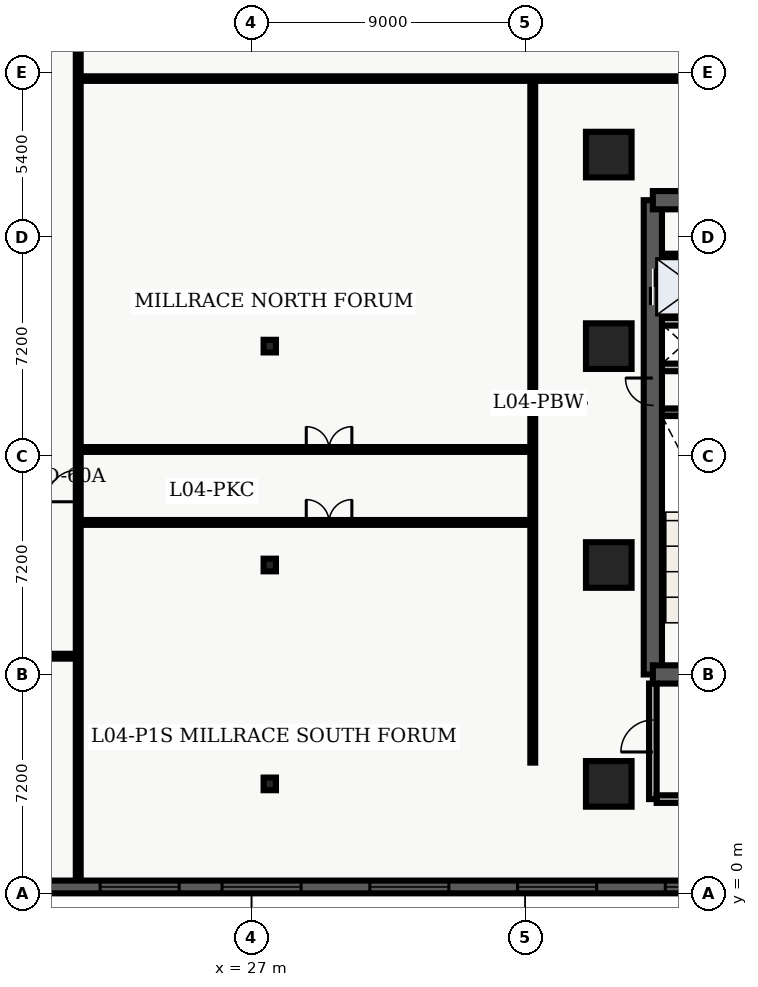
"""IFC4 building model, lengths in metres.
Left out: names, types, materials, properties, quantities, classifications, styles, units other than length and angle.
Written with IfcOpenShell. Run it as: python <this file> out.ifc"""

import sys

from ifc_helpers import new_model, entity, si_unit, converted_unit, direction, frame, origin_with_axes, origin_2d_with_axis, place, context, subcontext, project, spatial, polyline, rectangle, i_section, outline, extrude, element, fill, save


model = new_model("IFC4")
c1 = context("Model", 3, precision=1e-05, world=origin_with_axes(), true_north=direction((0.0, 1.0)))
c2 = subcontext(c1, "Body", "Model", "MODEL_VIEW")
j1 = project(units=[si_unit("LENGTHUNIT", "METRE"), converted_unit("PLANEANGLEUNIT", "DEGREE", entity("IfcPlaneAngleMeasure", 0.017), si_unit("PLANEANGLEUNIT", "RADIAN"), dimensions=[0, 0, 0, 0, 0, 0, 0])], contexts=[c1])
p1 = place(None, origin_with_axes())
s1 = spatial("IfcSite", under=j1, at=p1, CompositionType="ELEMENT")
p2 = place(p1, origin_with_axes())
s2 = spatial("IfcBuilding", under=s1, at=p2, CompositionType="ELEMENT")
p3 = place(p2, frame((0.0, 0.0, 19.8), z_axis=(0.0, 0.0, 1.0), x_axis=(1.0, 0.0, 0.0)))
s3 = spatial("IfcBuildingStorey", under=s2, at=p3, CompositionType="ELEMENT", Elevation=19.8)
p4 = place(p3, frame((40.2, 7.2, 0.0), z_axis=(0.0, 0.0, 1.0), x_axis=(0.0, 1.0, 0.0)))
e1 = element("IfcWall", 1, at=p4, inside=s3, PredefinedType="SHEAR", context=c2, shape_type="SweptSolid", body=[
    extrude(outline(polyline([(0.0, -0.3), (15.6, -0.3), (15.6, 0.3), (0.0, 0.3), (0.0, -0.3)])), origin_with_axes(), (0.0, 0.0, 1.0), 4.26),
])
p5 = place(p4, frame((12.75, 0.0, 0.0), z_axis=(0.0, 0.0, 1.0), x_axis=(1.0, 0.0, 0.0)))
e2 = element("IfcOpeningElement", 2, at=p5, cuts=e1, PredefinedType="OPENING", context=c2, shape_type="SweptSolid", body=[
    extrude(rectangle(XDim=1.2, YDim=0.62, at=origin_2d_with_axis()), origin_with_axes(), (0.0, 0.0, 1.0), 2.15),
])
p6 = place(p4, frame((9.3, 0.0, 0.0), z_axis=(0.0, 0.0, 1.0), x_axis=(1.0, 0.0, 0.0)))
e3 = element("IfcOpeningElement", 3, at=p6, cuts=e1, PredefinedType="OPENING", context=c2, shape_type="SweptSolid", body=[
    extrude(rectangle(XDim=0.9, YDim=0.62, at=origin_2d_with_axis()), origin_with_axes(), (0.0, 0.0, 1.0), 2.15),
])
p7 = place(p3, frame((40.2, 7.2, 0.0), z_axis=(0.0, 0.0, 1.0), x_axis=(1.0, 0.0, 0.0)))
e4 = element("IfcWall", 4, at=p7, inside=s3, PredefinedType="SHEAR", context=c2, shape_type="SweptSolid", body=[
    extrude(outline(polyline([(0.0, -0.3), (7.85, -0.3), (7.85, 0.3), (0.0, 0.3), (0.0, -0.3)])), origin_with_axes(), (0.0, 0.0, 1.0), 4.26),
])
p8 = place(p7, frame((2.175, 0.0, 0.0), z_axis=(0.0, 0.0, 1.0), x_axis=(1.0, 0.0, 0.0)))
e5 = element("IfcOpeningElement", 5, at=p8, cuts=e4, PredefinedType="OPENING", context=c2, shape_type="SweptSolid", body=[
    extrude(rectangle(XDim=1.05, YDim=0.62, at=origin_2d_with_axis()), origin_with_axes(), (0.0, 0.0, 1.0), 2.15),
])
p9 = place(p3, frame((40.2, 22.8, 0.0), z_axis=(0.0, 0.0, 1.0), x_axis=(1.0, 0.0, 0.0)))
e6 = element("IfcWall", 6, at=p9, inside=s3, PredefinedType="SHEAR", context=c2, shape_type="SweptSolid", body=[
    extrude(outline(polyline([(0.0, -0.3), (7.85, -0.3), (7.85, 0.3), (0.0, 0.3), (0.0, -0.3)])), origin_with_axes(), (0.0, 0.0, 1.0), 4.26),
])
p10 = place(p9, frame((5.775, 0.0, 0.0), z_axis=(0.0, 0.0, 1.0), x_axis=(1.0, 0.0, 0.0)))
e7 = element("IfcOpeningElement", 7, at=p10, cuts=e6, PredefinedType="OPENING", context=c2, shape_type="SweptSolid", body=[
    extrude(rectangle(XDim=1.05, YDim=0.62, at=origin_2d_with_axis()), origin_with_axes(), (0.0, 0.0, 1.0), 2.15),
])
p11 = place(p9, frame((2.15, 0.0, 0.0), z_axis=(0.0, 0.0, 1.0), x_axis=(1.0, 0.0, 0.0)))
e8 = element("IfcOpeningElement", 8, at=p11, cuts=e6, PredefinedType="OPENING", context=c2, shape_type="SweptSolid", body=[
    extrude(rectangle(XDim=0.9, YDim=0.62, at=origin_2d_with_axis()), origin_with_axes(), (0.0, 0.0, 1.0), 2.15),
])
p12 = place(p3, frame((40.5, 15.825, 0.0), z_axis=(0.0, 0.0, 1.0), x_axis=(1.0, 0.0, 0.0)))
e9 = element("IfcWall", 9, at=p12, inside=s3, PredefinedType="SHEAR", context=c2, shape_type="SweptSolid", body=[
    extrude(outline(polyline([(0.0, -0.125), (3.5, -0.125), (3.5, 0.125), (0.0, 0.125), (0.0, -0.125)])), origin_with_axes(), (0.0, 0.0, 1.0), 4.26),
])
p13 = place(p3, frame((40.5, 17.3, 0.0), z_axis=(0.0, 0.0, 1.0), x_axis=(1.0, 0.0, 0.0)))
e10 = element("IfcWall", 10, at=p13, inside=s3, PredefinedType="SOLIDWALL", context=c2, shape_type="SweptSolid", body=[
    extrude(outline(polyline([(0.0, -0.125), (3.5, -0.125), (3.5, 0.125), (0.0, 0.125), (0.0, -0.125)])), origin_with_axes(), (0.0, 0.0, 1.0), 3.3),
])
p14 = place(p13, frame((2.4, 0.0, 0.0), z_axis=(0.0, 0.0, 1.0), x_axis=(1.0, 0.0, 0.0)))
e11 = element("IfcOpeningElement", 11, at=p14, cuts=e10, PredefinedType="OPENING", context=c2, shape_type="SweptSolid", body=[
    extrude(rectangle(XDim=0.9, YDim=0.27, at=origin_2d_with_axis()), origin_with_axes(), (0.0, 0.0, 1.0), 2.15),
])
p15 = place(p3, frame((40.5, 18.8, 0.0), z_axis=(0.0, 0.0, 1.0), x_axis=(1.0, 0.0, 0.0)))
e12 = element("IfcWall", 12, at=p15, inside=s3, PredefinedType="SOLIDWALL", context=c2, shape_type="SweptSolid", body=[
    extrude(outline(polyline([(0.0, -0.125), (3.5, -0.125), (3.5, 0.125), (0.0, 0.125), (0.0, -0.125)])), origin_with_axes(), (0.0, 0.0, 1.0), 3.3),
])
p16 = place(p3, frame((40.2, 3.1, 0.0), z_axis=(0.0, 0.0, 1.0), x_axis=(0.0, 1.0, 0.0)))
e13 = element("IfcWall", 13, at=p16, inside=s3, PredefinedType="SOLIDWALL", context=c2, shape_type="SweptSolid", body=[
    extrude(outline(polyline([(0.0, -0.125), (3.8, -0.125), (3.8, 0.125), (0.0, 0.125), (0.0, -0.125)])), origin_with_axes(), (0.0, 0.0, 1.0), 3.3),
])
p17 = place(p16, frame((2.075, 0.0, 0.0), z_axis=(0.0, 0.0, 1.0), x_axis=(1.0, 0.0, 0.0)))
e14 = element("IfcOpeningElement", 14, at=p17, cuts=e13, PredefinedType="OPENING", context=c2, shape_type="SweptSolid", body=[
    extrude(rectangle(XDim=1.05, YDim=0.27, at=origin_2d_with_axis()), origin_with_axes(), (0.0, 0.0, 1.0), 2.15),
])
p18 = place(p3, frame((40.325, 3.1, 0.0), z_axis=(0.0, 0.0, 1.0), x_axis=(1.0, 0.0, 0.0)))
e15 = element("IfcWall", 15, at=p18, inside=s3, PredefinedType="SOLIDWALL", context=c2, shape_type="SweptSolid", body=[
    extrude(outline(polyline([(0.0, -0.125), (3.95, -0.125), (3.95, 0.125), (0.0, 0.125), (0.0, -0.125)])), origin_with_axes(), (0.0, 0.0, 1.0), 3.3),
])
for number, where, z_axis, x_axis in (
    (16, (27.6, 3.6, 0.0), (0.0, 0.0, 1.0), (1.0, 0.0, 0.0)),
    (17, (27.6, 10.8, 0.0), (0.0, 0.0, 1.0), (1.0, 0.0, 0.0)),
    (18, (27.6, 18.0, 0.0), (0.0, 0.0, 1.0), (1.0, 0.0, 0.0)),
):
    element("IfcColumn", number, at=place(p3, frame(where, z_axis=z_axis, x_axis=x_axis)), inside=s3, PredefinedType="COLUMN", context=c2, shape_type="SweptSolid", body=[
        extrude(i_section(OverallWidth=0.406, OverallDepth=0.416, WebThickness=0.03, FlangeThickness=0.048, FilletRadius=0.022, at=origin_2d_with_axis()), origin_with_axes(), (0.0, 0.0, 1.0), 4.5),
    ])
for number, where, z_axis, x_axis in (
    (19, (38.75, 3.6, 0.0), (0.0, 0.0, 1.0), (1.0, 0.0, 0.0)),
    (20, (38.75, 10.8, 0.0), (0.0, 0.0, 1.0), (1.0, 0.0, 0.0)),
    (21, (38.75, 18.0, 0.0), (0.0, 0.0, 1.0), (1.0, 0.0, 0.0)),
    (22, (38.75, 24.3, 0.0), (0.0, 0.0, 1.0), (1.0, 0.0, 0.0)),
):
    element("IfcColumn", number, at=place(p3, frame(where, z_axis=z_axis, x_axis=x_axis)), inside=s3, PredefinedType="COLUMN", context=c2, shape_type="SweptSolid", body=[
        extrude(rectangle(XDim=1.5, YDim=1.5, at=origin_2d_with_axis()), origin_with_axes(), (0.0, 0.0, 1.0), 4.5),
    ])
p19 = place(p3, frame((40.5, 20.96, 0.0), z_axis=(0.0, 0.0, 1.0), x_axis=(1.0, 0.0, 0.0)))
e23 = element("IfcWall", 23, at=p19, inside=s3, PredefinedType="PARTITIONING", context=c2, shape_type="SweptSolid", body=[
    extrude(outline(polyline([(0.0, -0.08), (3.5, -0.08), (3.5, 0.08), (0.0, 0.08), (0.0, -0.08)])), origin_with_axes(), (0.0, 0.0, 1.0), 3.2),
])
p20 = place(p3, frame((0.38, 7.8, 0.0), z_axis=(0.0, 0.0, 1.0), x_axis=(1.0, 0.0, 0.0)))
e24 = element("IfcWall", 24, at=p20, inside=s3, PredefinedType="PARTITIONING", context=c2, shape_type="SweptSolid", body=[
    extrude(outline(polyline([(0.0, -0.08), (20.92, -0.08), (20.92, 0.08), (0.0, 0.08), (0.0, -0.08)])), origin_with_axes(), (0.0, 0.0, 1.0), 3.2),
])
p21 = place(p20, frame((3.7, 0.0, 0.0), z_axis=(0.0, 0.0, 1.0), x_axis=(1.0, 0.0, 0.0)))
e25 = element("IfcOpeningElement", 25, at=p21, cuts=e24, PredefinedType="OPENING", context=c2, shape_type="SweptSolid", body=[
    extrude(rectangle(XDim=1.0, YDim=0.18, at=origin_2d_with_axis()), origin_with_axes(), (0.0, 0.0, 1.0), 2.15),
])
p22 = place(p20, frame((15.3, 0.0, 0.0), z_axis=(0.0, 0.0, 1.0), x_axis=(1.0, 0.0, 0.0)))
e26 = element("IfcOpeningElement", 26, at=p22, cuts=e24, PredefinedType="OPENING", context=c2, shape_type="SweptSolid", body=[
    extrude(rectangle(XDim=1.0, YDim=0.18, at=origin_2d_with_axis()), origin_with_axes(), (0.0, 0.0, 1.0), 2.15),
])
p23 = place(p3, frame((21.3, 0.38, 0.0), z_axis=(0.0, 0.0, 1.0), x_axis=(0.0, 1.0, 0.0)))
e27 = element("IfcWall", 27, at=p23, inside=s3, PredefinedType="PARTITIONING", context=c2, shape_type="SweptSolid", body=[
    extrude(outline(polyline([(0.0, -0.08), (35.24, -0.08), (35.24, 0.08), (0.0, 0.08), (0.0, -0.08)])), origin_with_axes(), (0.0, 0.0, 1.0), 3.2),
])
p24 = place(p23, frame((13.025, 0.0, 0.0), z_axis=(0.0, 0.0, 1.0), x_axis=(1.0, 0.0, 0.0)))
e28 = element("IfcOpeningElement", 28, at=p24, cuts=e27, PredefinedType="OPENING", context=c2, shape_type="SweptSolid", body=[
    extrude(rectangle(XDim=1.05, YDim=0.18, at=origin_2d_with_axis()), origin_with_axes(), (0.0, 0.0, 1.0), 2.15),
])
p25 = place(p23, frame((31.25, 0.0, 0.0), z_axis=(0.0, 0.0, 1.0), x_axis=(1.0, 0.0, 0.0)))
e29 = element("IfcOpeningElement", 29, at=p25, cuts=e27, PredefinedType="OPENING", context=c2, shape_type="SweptSolid", body=[
    extrude(rectangle(XDim=1.5, YDim=0.18, at=origin_2d_with_axis()), origin_with_axes(), (0.0, 0.0, 1.0), 2.2),
])
p26 = place(p3, frame((21.3, 12.2, 0.0), z_axis=(0.0, 0.0, 1.0), x_axis=(1.0, 0.0, 0.0)))
e30 = element("IfcWall", 30, at=p26, inside=s3, PredefinedType="PARTITIONING", context=c2, shape_type="SweptSolid", body=[
    extrude(outline(polyline([(0.0, -0.08), (14.95, -0.08), (14.95, 0.08), (0.0, 0.08), (0.0, -0.08)])), origin_with_axes(), (0.0, 0.0, 1.0), 3.2),
])
p27 = place(p26, frame((8.25, 0.0, 0.0), z_axis=(0.0, 0.0, 1.0), x_axis=(1.0, 0.0, 0.0)))
e31 = element("IfcOpeningElement", 31, at=p27, cuts=e30, PredefinedType="OPENING", context=c2, shape_type="SweptSolid", body=[
    extrude(rectangle(XDim=1.5, YDim=0.18, at=origin_2d_with_axis()), origin_with_axes(), (0.0, 0.0, 1.0), 2.2),
])
p28 = place(p3, frame((21.3, 14.6, 0.0), z_axis=(0.0, 0.0, 1.0), x_axis=(1.0, 0.0, 0.0)))
e32 = element("IfcWall", 32, at=p28, inside=s3, PredefinedType="PARTITIONING", context=c2, shape_type="SweptSolid", body=[
    extrude(outline(polyline([(0.0, -0.08), (14.95, -0.08), (14.95, 0.08), (0.0, 0.08), (0.0, -0.08)])), origin_with_axes(), (0.0, 0.0, 1.0), 3.2),
])
p29 = place(p28, frame((8.25, 0.0, 0.0), z_axis=(0.0, 0.0, 1.0), x_axis=(1.0, 0.0, 0.0)))
e33 = element("IfcOpeningElement", 33, at=p29, cuts=e32, PredefinedType="OPENING", context=c2, shape_type="SweptSolid", body=[
    extrude(rectangle(XDim=1.5, YDim=0.18, at=origin_2d_with_axis()), origin_with_axes(), (0.0, 0.0, 1.0), 2.2),
])
p30 = place(p3, frame((36.25, 4.3, 0.0), z_axis=(0.0, 0.0, 1.0), x_axis=(0.0, 1.0, 0.0)))
e34 = element("IfcWall", 34, at=p30, inside=s3, PredefinedType="PARTITIONING", context=c2, shape_type="SweptSolid", body=[
    extrude(outline(polyline([(0.0, -0.08), (22.5, -0.08), (22.5, 0.08), (0.0, 0.08), (0.0, -0.08)])), origin_with_axes(), (0.0, 0.0, 1.0), 3.2),
])
p31 = place(p3, frame((21.3, 26.8, 0.0), z_axis=(0.0, 0.0, 1.0), x_axis=(1.0, 0.0, 0.0)))
e35 = element("IfcWall", 35, at=p31, inside=s3, PredefinedType="PARTITIONING", context=c2, shape_type="SweptSolid", body=[
    extrude(outline(polyline([(0.0, -0.075), (29.25, -0.075), (29.25, 0.075), (0.0, 0.075), (0.0, -0.075)])), origin_with_axes(), (0.0, 0.0, 1.0), 3.2),
])
p32 = place(p3, frame((64.38, 0.21, 0.0), z_axis=(0.0, 0.0, 1.0), x_axis=(-1.0, 0.0, 0.0)))
e36 = element("IfcWall", 36, at=p32, inside=s3, PredefinedType="SOLIDWALL", context=c2, shape_type="SweptSolid", body=[
    extrude(outline(polyline([(0.0, -0.21), (64.38, -0.21), (64.38, 0.21), (0.0, 0.21), (0.0, -0.21)])), origin_with_axes(), (0.0, 0.0, 1.0), 4.26),
])
p33 = place(p32, frame((3.03, 0.0, 0.45), z_axis=(0.0, 0.0, 1.0), x_axis=(1.0, 0.0, 0.0)))
e37 = element("IfcOpeningElement", 37, at=p33, cuts=e36, PredefinedType="OPENING", context=c2, shape_type="SweptSolid", body=[
    extrude(rectangle(XDim=2.6, YDim=0.44, at=origin_2d_with_axis()), origin_with_axes(), (0.0, 0.0, 1.0), 2.8),
])
p34 = place(p32, frame((7.89, 0.0, 0.45), z_axis=(0.0, 0.0, 1.0), x_axis=(1.0, 0.0, 0.0)))
e38 = element("IfcOpeningElement", 38, at=p34, cuts=e36, PredefinedType="OPENING", context=c2, shape_type="SweptSolid", body=[
    extrude(rectangle(XDim=2.6, YDim=0.44, at=origin_2d_with_axis()), origin_with_axes(), (0.0, 0.0, 1.0), 2.8),
])
p35 = place(p32, frame((11.9, 0.0, 0.45), z_axis=(0.0, 0.0, 1.0), x_axis=(1.0, 0.0, 0.0)))
e39 = element("IfcOpeningElement", 39, at=p35, cuts=e36, PredefinedType="OPENING", context=c2, shape_type="SweptSolid", body=[
    extrude(rectangle(XDim=2.6, YDim=0.44, at=origin_2d_with_axis()), origin_with_axes(), (0.0, 0.0, 1.0), 2.8),
])
p36 = place(p32, frame((17.61, 0.0, 0.45), z_axis=(0.0, 0.0, 1.0), x_axis=(1.0, 0.0, 0.0)))
e40 = element("IfcOpeningElement", 40, at=p36, cuts=e36, PredefinedType="OPENING", context=c2, shape_type="SweptSolid", body=[
    extrude(rectangle(XDim=2.6, YDim=0.44, at=origin_2d_with_axis()), origin_with_axes(), (0.0, 0.0, 1.0), 2.8),
])
p37 = place(p32, frame((22.47, 0.0, 0.45), z_axis=(0.0, 0.0, 1.0), x_axis=(1.0, 0.0, 0.0)))
e41 = element("IfcOpeningElement", 41, at=p37, cuts=e36, PredefinedType="OPENING", context=c2, shape_type="SweptSolid", body=[
    extrude(rectangle(XDim=2.6, YDim=0.44, at=origin_2d_with_axis()), origin_with_axes(), (0.0, 0.0, 1.0), 2.8),
])
p38 = place(p32, frame((27.33, 0.0, 0.45), z_axis=(0.0, 0.0, 1.0), x_axis=(1.0, 0.0, 0.0)))
e42 = element("IfcOpeningElement", 42, at=p38, cuts=e36, PredefinedType="OPENING", context=c2, shape_type="SweptSolid", body=[
    extrude(rectangle(XDim=2.6, YDim=0.44, at=origin_2d_with_axis()), origin_with_axes(), (0.0, 0.0, 1.0), 2.8),
])
p39 = place(p32, frame((32.19, 0.0, 0.45), z_axis=(0.0, 0.0, 1.0), x_axis=(1.0, 0.0, 0.0)))
e43 = element("IfcOpeningElement", 43, at=p39, cuts=e36, PredefinedType="OPENING", context=c2, shape_type="SweptSolid", body=[
    extrude(rectangle(XDim=2.6, YDim=0.44, at=origin_2d_with_axis()), origin_with_axes(), (0.0, 0.0, 1.0), 2.8),
])
p40 = place(p32, frame((37.05, 0.0, 0.45), z_axis=(0.0, 0.0, 1.0), x_axis=(1.0, 0.0, 0.0)))
e44 = element("IfcOpeningElement", 44, at=p40, cuts=e36, PredefinedType="OPENING", context=c2, shape_type="SweptSolid", body=[
    extrude(rectangle(XDim=2.6, YDim=0.44, at=origin_2d_with_axis()), origin_with_axes(), (0.0, 0.0, 1.0), 2.8),
])
p41 = place(p32, frame((41.06, 0.0, 0.45), z_axis=(0.0, 0.0, 1.0), x_axis=(1.0, 0.0, 0.0)))
e45 = element("IfcOpeningElement", 45, at=p41, cuts=e36, PredefinedType="OPENING", context=c2, shape_type="SweptSolid", body=[
    extrude(rectangle(XDim=2.6, YDim=0.44, at=origin_2d_with_axis()), origin_with_axes(), (0.0, 0.0, 1.0), 2.8),
])
p42 = place(p32, frame((46.77, 0.0, 0.45), z_axis=(0.0, 0.0, 1.0), x_axis=(1.0, 0.0, 0.0)))
e46 = element("IfcOpeningElement", 46, at=p42, cuts=e36, PredefinedType="OPENING", context=c2, shape_type="SweptSolid", body=[
    extrude(rectangle(XDim=2.6, YDim=0.44, at=origin_2d_with_axis()), origin_with_axes(), (0.0, 0.0, 1.0), 2.8),
])
p43 = place(p32, frame((50.78, 0.0, 0.45), z_axis=(0.0, 0.0, 1.0), x_axis=(1.0, 0.0, 0.0)))
e47 = element("IfcOpeningElement", 47, at=p43, cuts=e36, PredefinedType="OPENING", context=c2, shape_type="SweptSolid", body=[
    extrude(rectangle(XDim=2.6, YDim=0.44, at=origin_2d_with_axis()), origin_with_axes(), (0.0, 0.0, 1.0), 2.8),
])
p44 = place(p32, frame((56.49, 0.0, 0.45), z_axis=(0.0, 0.0, 1.0), x_axis=(1.0, 0.0, 0.0)))
e48 = element("IfcOpeningElement", 48, at=p44, cuts=e36, PredefinedType="OPENING", context=c2, shape_type="SweptSolid", body=[
    extrude(rectangle(XDim=2.6, YDim=0.44, at=origin_2d_with_axis()), origin_with_axes(), (0.0, 0.0, 1.0), 2.8),
])
p45 = place(p32, frame((61.35, 0.0, 0.45), z_axis=(0.0, 0.0, 1.0), x_axis=(1.0, 0.0, 0.0)))
e49 = element("IfcOpeningElement", 49, at=p45, cuts=e36, PredefinedType="OPENING", context=c2, shape_type="SweptSolid", body=[
    extrude(rectangle(XDim=2.6, YDim=0.44, at=origin_2d_with_axis()), origin_with_axes(), (0.0, 0.0, 1.0), 2.8),
])
p46 = place(p4, frame((12.75, 0.0, 0.0), z_axis=(0.0, 0.0, 1.0), x_axis=(1.0, 0.0, 0.0)))
e50 = element("IfcDoor", 50, at=p46, inside=s3, OperationType="DOUBLE_DOOR_SLIDING", PredefinedType="DOOR", context=c2, shape_type="SweptSolid", body=[
    extrude(rectangle(XDim=1.2, YDim=0.09, at=origin_2d_with_axis()), origin_with_axes(), (0.0, 0.0, 1.0), 2.15),
])
fill(e2, e50)
p47 = place(p4, frame((9.3, 0.0, 0.0), z_axis=(0.0, 0.0, 1.0), x_axis=(1.0, 0.0, 0.0)))
e51 = element("IfcDoor", 51, at=p47, inside=s3, OperationType="SINGLE_SWING_RIGHT", PredefinedType="DOOR", context=c2, shape_type="SweptSolid", body=[
    extrude(rectangle(XDim=0.9, YDim=0.09, at=origin_2d_with_axis()), origin_with_axes(), (0.0, 0.0, 1.0), 2.15),
])
fill(e3, e51)
p48 = place(p16, frame((2.075, 0.0, 0.0), z_axis=(0.0, 0.0, 1.0), x_axis=(1.0, 0.0, 0.0)))
e52 = element("IfcDoor", 52, at=p48, inside=s3, OperationType="SINGLE_SWING_LEFT", PredefinedType="DOOR", context=c2, shape_type="SweptSolid", body=[
    extrude(rectangle(XDim=1.05, YDim=0.09, at=origin_2d_with_axis()), origin_with_axes(), (0.0, 0.0, 1.0), 2.15),
])
fill(e14, e52)
p49 = place(p23, frame((13.025, 0.0, 0.0), z_axis=(0.0, 0.0, 1.0), x_axis=(1.0, 0.0, 0.0)))
e53 = element("IfcDoor", 53, at=p49, inside=s3, OperationType="SINGLE_SWING_LEFT", PredefinedType="DOOR", context=c2, shape_type="SweptSolid", body=[
    extrude(rectangle(XDim=1.05, YDim=0.09, at=origin_2d_with_axis()), origin_with_axes(), (0.0, 0.0, 1.0), 2.15),
])
fill(e28, e53)
p50 = place(p26, frame((8.25, 0.0, 0.0), z_axis=(0.0, 0.0, 1.0), x_axis=(1.0, 0.0, 0.0)))
e54 = element("IfcDoor", 54, at=p50, inside=s3, OperationType="DOUBLE_DOOR_SINGLE_SWING", PredefinedType="DOOR", context=c2, shape_type="SweptSolid", body=[
    extrude(rectangle(XDim=1.5, YDim=0.09, at=origin_2d_with_axis()), origin_with_axes(), (0.0, 0.0, 1.0), 2.2),
])
fill(e31, e54)
p51 = place(p28, frame((8.25, 0.0, 0.0), z_axis=(0.0, 0.0, 1.0), x_axis=(1.0, 0.0, 0.0)))
e55 = element("IfcDoor", 55, at=p51, inside=s3, OperationType="DOUBLE_DOOR_SINGLE_SWING", PredefinedType="DOOR", context=c2, shape_type="SweptSolid", body=[
    extrude(rectangle(XDim=1.5, YDim=0.09, at=origin_2d_with_axis()), origin_with_axes(), (0.0, 0.0, 1.0), 2.2),
])
fill(e33, e55)
p52 = place(p32, frame((22.47, 0.0, 0.45), z_axis=(0.0, 0.0, 1.0), x_axis=(1.0, 0.0, 0.0)))
e56 = element("IfcWindow", 56, at=p52, inside=s3, PredefinedType="WINDOW", context=c2, shape_type="SweptSolid", body=[
    extrude(rectangle(XDim=2.6, YDim=0.09, at=origin_2d_with_axis()), origin_with_axes(), (0.0, 0.0, 1.0), 2.8),
])
fill(e41, e56)
p53 = place(p32, frame((27.33, 0.0, 0.45), z_axis=(0.0, 0.0, 1.0), x_axis=(1.0, 0.0, 0.0)))
e57 = element("IfcWindow", 57, at=p53, inside=s3, PredefinedType="WINDOW", context=c2, shape_type="SweptSolid", body=[
    extrude(rectangle(XDim=2.6, YDim=0.09, at=origin_2d_with_axis()), origin_with_axes(), (0.0, 0.0, 1.0), 2.8),
])
fill(e42, e57)
p54 = place(p32, frame((32.19, 0.0, 0.45), z_axis=(0.0, 0.0, 1.0), x_axis=(1.0, 0.0, 0.0)))
e58 = element("IfcWindow", 58, at=p54, inside=s3, PredefinedType="WINDOW", context=c2, shape_type="SweptSolid", body=[
    extrude(rectangle(XDim=2.6, YDim=0.09, at=origin_2d_with_axis()), origin_with_axes(), (0.0, 0.0, 1.0), 2.8),
])
fill(e43, e58)
p55 = place(p32, frame((37.05, 0.0, 0.45), z_axis=(0.0, 0.0, 1.0), x_axis=(1.0, 0.0, 0.0)))
e59 = element("IfcWindow", 59, at=p55, inside=s3, PredefinedType="WINDOW", context=c2, shape_type="SweptSolid", body=[
    extrude(rectangle(XDim=2.6, YDim=0.09, at=origin_2d_with_axis()), origin_with_axes(), (0.0, 0.0, 1.0), 2.8),
])
fill(e44, e59)
p56 = place(p32, frame((41.06, 0.0, 0.45), z_axis=(0.0, 0.0, 1.0), x_axis=(1.0, 0.0, 0.0)))
e60 = element("IfcWindow", 60, at=p56, inside=s3, PredefinedType="WINDOW", context=c2, shape_type="SweptSolid", body=[
    extrude(rectangle(XDim=2.6, YDim=0.09, at=origin_2d_with_axis()), origin_with_axes(), (0.0, 0.0, 1.0), 2.8),
])
fill(e45, e60)
save(model, sys.argv[1])
